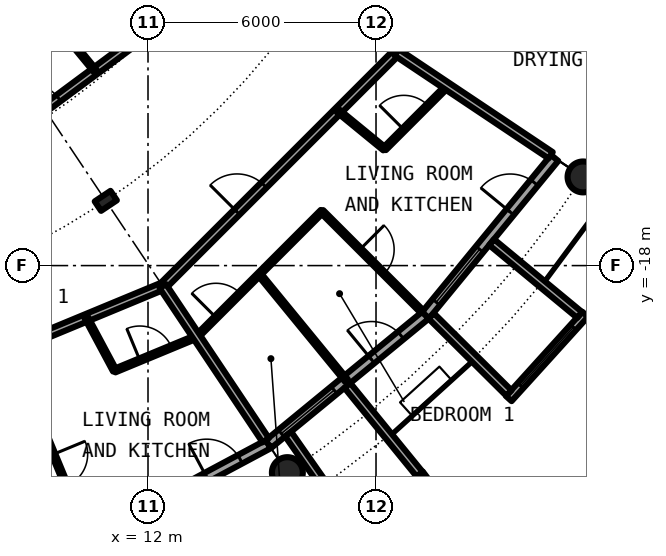
"""IFC4 building model, lengths in metres.
Left out: names, types, materials, properties, quantities, classifications, styles, units other than length and angle.
Written with IfcOpenShell. Run it as: python <this file> out.ifc"""

import sys

from ifc_helpers import new_model, si_unit, direction, frame, frame_2d, origin, origin_2d, place, context, subcontext, project, spatial, rectangle, circle, hollow_circle, i_section, extrude, element, fill, save


model = new_model("IFC4")
c1 = context("Model", 3, precision=1e-05, world=origin(), true_north=direction((0.0, 1.0)))
c2 = subcontext(c1, "Body", "Model", "MODEL_VIEW")
j1 = project(units=[si_unit("LENGTHUNIT", "METRE"), si_unit("PLANEANGLEUNIT", "RADIAN")], contexts=[c1])
p1 = place(None, origin())
s1 = spatial("IfcSite", under=j1, at=p1, CompositionType="ELEMENT")
p2 = place(p1, origin())
s2 = spatial("IfcBuilding", under=s1, at=p2, CompositionType="ELEMENT")
p3 = place(p2, frame((0.0, 0.0, 167.7)))
s3 = spatial("IfcBuildingStorey", under=s2, at=p3, CompositionType="ELEMENT", Elevation=167.7)
for number, where, z_axis, x_axis in (
    (1, (15.667, -23.448, 0.0), (0.0, 0.0, 1.0), (1.0, 0.0, 0.0)),
    (2, (23.448, -15.667, 0.0), (0.0, 0.0, 1.0), (1.0, 0.0, 0.0)),
):
    element("IfcColumn", number, at=place(p3, frame(where, z_axis=z_axis, x_axis=x_axis)), inside=s3, PredefinedType="COLUMN", context=c2, shape_type="SweptSolid", body=[
        extrude(hollow_circle(Radius=0.406, WallThickness=0.04, at=origin_2d()), origin(), (0.0, 0.0, 1.0), 3.05),
    ])
p4 = place(p3, frame((10.889, -16.297, 0.0), z_axis=(0.0, 0.0, 1.0), x_axis=(0.55557023302, -0.831469612303, 0.0)))
e3 = element("IfcColumn", 3, at=p4, inside=s3, PredefinedType="COLUMN", context=c2, shape_type="SweptSolid", body=[
    extrude(i_section(OverallWidth=0.3, OverallDepth=0.5, WebThickness=0.014, FlangeThickness=0.028, FilletRadius=0.027, at=origin_2d()), origin(), (0.0, 0.0, 1.0), 3.05),
])
p5 = place(p3, frame((10.447, -25.222, 0.0), z_axis=(0.0, 0.0, 1.0), x_axis=(0.881915646801, 0.471407246368, 0.0)))
e4 = element("IfcWall", 4, at=p5, inside=s3, PredefinedType="SOLIDWALL", context=c2, shape_type="SweptSolid", body=[
    extrude(rectangle(XDim=5.352, YDim=0.25, at=frame_2d((2.676, 0.0))), origin(), (0.0, 0.0, 1.0), 2.7),
])
p6 = place(p5, frame((0.441, 0.0, 0.3)))
e5 = element("IfcOpeningElement", 5, at=p6, cuts=e4, PredefinedType="OPENING", context=c2, shape_type="SweptSolid", body=[
    extrude(rectangle(XDim=1.8, YDim=2.1, at=frame_2d((0.9, 1.05))), frame((0.0, 0.135, 0.0), z_axis=(0.0, -1.0, 0.0), x_axis=(1.0, 0.0, 0.0)), (0.0, 0.0, 1.0), 0.27),
])
p7 = place(p5, frame((3.51, 0.0, 0.0)))
e6 = element("IfcOpeningElement", 6, at=p7, cuts=e4, PredefinedType="OPENING", context=c2, shape_type="SweptSolid", body=[
    extrude(rectangle(XDim=1.0, YDim=2.2, at=frame_2d((0.5, 1.1))), frame((0.0, 0.135, 0.0), z_axis=(0.0, -1.0, 0.0), x_axis=(1.0, 0.0, 0.0)), (0.0, 0.0, 1.0), 0.27),
])
p8 = place(p3, frame((15.167, -22.699, 0.0), z_axis=(0.0, 0.0, 1.0), x_axis=(0.773019449054, 0.634382322723, 0.0)))
e7 = element("IfcWall", 7, at=p8, inside=s3, PredefinedType="SOLIDWALL", context=c2, shape_type="SweptSolid", body=[
    extrude(rectangle(XDim=5.352, YDim=0.25, at=frame_2d((2.676, 0.0))), origin(), (0.0, 0.0, 1.0), 2.7),
])
p9 = place(p8, frame((0.441, 0.0, 0.3)))
e8 = element("IfcOpeningElement", 8, at=p9, cuts=e7, PredefinedType="OPENING", context=c2, shape_type="SweptSolid", body=[
    extrude(rectangle(XDim=1.8, YDim=2.1, at=frame_2d((0.9, 1.05))), frame((0.0, 0.135, 0.0), z_axis=(0.0, -1.0, 0.0), x_axis=(1.0, 0.0, 0.0)), (0.0, 0.0, 1.0), 0.27),
])
p10 = place(p8, frame((3.51, 0.0, 0.0)))
e9 = element("IfcOpeningElement", 9, at=p10, cuts=e7, PredefinedType="OPENING", context=c2, shape_type="SweptSolid", body=[
    extrude(rectangle(XDim=1.0, YDim=2.2, at=frame_2d((0.5, 1.1))), frame((0.0, 0.135, 0.0), z_axis=(0.0, -1.0, 0.0), x_axis=(1.0, 0.0, 0.0)), (0.0, 0.0, 1.0), 0.27),
])
p11 = place(p3, frame((17.337, -24.972, -0.03), z_axis=(0.0, 0.0, 1.0), x_axis=(0.797887588059, 0.602806268067, 0.0)))
e10 = element("IfcWall", 10, at=p11, inside=s3, PredefinedType="SOLIDWALL", context=c2, shape_type="SweptSolid", body=[
    extrude(rectangle(XDim=2.447, YDim=0.2, at=frame_2d((1.223, 0.0))), origin(), (0.0, 0.0, 1.0), 2.73),
])
p12 = place(p11, frame((0.183, 0.0, 0.33)))
e11 = element("IfcOpeningElement", 11, at=p12, cuts=e10, PredefinedType="OPENING", context=c2, shape_type="SweptSolid", body=[
    extrude(circle(Radius=1.04, at=frame_2d((1.04, 1.04))), frame((0.0, 0.11, 0.0), z_axis=(0.0, -1.0, 0.0), x_axis=(1.0, 0.0, 0.0)), (0.0, 0.0, 1.0), 0.22),
])
p13 = place(p3, frame((15.688, -22.433, -0.03), z_axis=(0.0, 0.0, 1.0), x_axis=(0.573260687834, -0.819373043115, 0.0)))
e12 = element("IfcWall", 12, at=p13, inside=s3, PredefinedType="SOLIDWALL", context=c2, shape_type="SweptSolid", body=[
    extrude(rectangle(XDim=2.925, YDim=0.2, at=frame_2d((1.463, 0.0))), origin(), (0.0, 0.0, 1.0), 2.73),
])
p14 = place(p3, frame((17.246, -21.155, -0.03), z_axis=(0.0, 0.0, 1.0), x_axis=(0.631741648902, -0.775179004516, 0.0)))
e13 = element("IfcWall", 13, at=p14, inside=s3, PredefinedType="SOLIDWALL", context=c2, shape_type="SweptSolid", body=[
    extrude(rectangle(XDim=3.006, YDim=0.2, at=frame_2d((1.503, 0.0))), origin(), (0.0, 0.0, 1.0), 2.73),
])
p15 = place(p3, frame((19.304, -19.304, 0.0), z_axis=(0.0, 0.0, 1.0), x_axis=(0.634382322723, 0.773019449054, 0.0)))
e14 = element("IfcWall", 14, at=p15, inside=s3, PredefinedType="SOLIDWALL", context=c2, shape_type="SweptSolid", body=[
    extrude(rectangle(XDim=5.352, YDim=0.25, at=frame_2d((2.676, 0.0))), origin(), (0.0, 0.0, 1.0), 2.7),
])
p16 = place(p15, frame((0.441, 0.0, 0.3)))
e15 = element("IfcOpeningElement", 15, at=p16, cuts=e14, PredefinedType="OPENING", context=c2, shape_type="SweptSolid", body=[
    extrude(rectangle(XDim=1.8, YDim=2.1, at=frame_2d((0.9, 1.05))), frame((0.0, 0.135, 0.0), z_axis=(0.0, -1.0, 0.0), x_axis=(1.0, 0.0, 0.0)), (0.0, 0.0, 1.0), 0.27),
])
p17 = place(p15, frame((3.51, 0.0, 0.0)))
e16 = element("IfcOpeningElement", 16, at=p17, cuts=e14, PredefinedType="OPENING", context=c2, shape_type="SweptSolid", body=[
    extrude(rectangle(XDim=1.0, YDim=2.2, at=frame_2d((0.5, 1.1))), frame((0.0, 0.135, 0.0), z_axis=(0.0, -1.0, 0.0), x_axis=(1.0, 0.0, 0.0)), (0.0, 0.0, 1.0), 0.27),
])
p18 = place(p3, frame((21.493, -21.5, -0.03), z_axis=(0.0, 0.0, 1.0), x_axis=(0.671506829416, 0.740998365753, 0.0)))
e17 = element("IfcWall", 17, at=p18, inside=s3, PredefinedType="SOLIDWALL", context=c2, shape_type="SweptSolid", body=[
    extrude(rectangle(XDim=2.993, YDim=0.2, at=frame_2d((1.497, 0.0))), origin(), (0.0, 0.0, 1.0), 2.73),
])
p19 = place(p18, frame((0.457, 0.0, 0.33)))
e18 = element("IfcOpeningElement", 18, at=p19, cuts=e17, PredefinedType="OPENING", context=c2, shape_type="SweptSolid", body=[
    extrude(circle(Radius=1.04, at=frame_2d((1.04, 1.04))), frame((0.0, 0.11, 0.0), z_axis=(0.0, -1.0, 0.0), x_axis=(1.0, 0.0, 0.0)), (0.0, 0.0, 1.0), 0.22),
])
p20 = place(p3, frame((19.45, -19.323, -0.03), z_axis=(0.0, 0.0, 1.0), x_axis=(0.709727076896, -0.704476739375, 0.0)))
e19 = element("IfcWall", 19, at=p20, inside=s3, PredefinedType="SOLIDWALL", context=c2, shape_type="SweptSolid", body=[
    extrude(rectangle(XDim=2.883, YDim=0.2, at=frame_2d((1.441, 0.0))), origin(), (0.0, 0.0, 1.0), 2.73),
])
p21 = place(p3, frame((21.041, -17.384, -0.03), z_axis=(0.0, 0.0, 1.0), x_axis=(0.770784861449, -0.63709551667, 0.0)))
e20 = element("IfcWall", 20, at=p21, inside=s3, PredefinedType="SOLIDWALL", context=c2, shape_type="SweptSolid", body=[
    extrude(rectangle(XDim=3.006, YDim=0.2, at=frame_2d((1.503, 0.0))), origin(), (0.0, 0.0, 1.0), 2.73),
])
p22 = place(p3, frame((11.124, -20.764, 0.0), z_axis=(0.0, 0.0, 1.0), x_axis=(0.923938991376, 0.382539854414, 0.0)))
e21 = element("IfcWall", 21, at=p22, inside=s3, PredefinedType="PARTITIONING", context=c2, shape_type="SweptSolid", body=[
    extrude(rectangle(XDim=2.331, YDim=0.1, at=frame_2d((1.166, 0.0))), origin(), (0.0, 0.0, 1.0), 2.7),
])
p23 = place(p22, frame((0.716, 0.0, 0.0)))
e22 = element("IfcOpeningElement", 22, at=p23, cuts=e21, PredefinedType="OPENING", context=c2, shape_type="SweptSolid", body=[
    extrude(rectangle(XDim=0.9, YDim=2.3, at=frame_2d((0.45, 1.15))), frame((0.0, 0.06, 0.0), z_axis=(0.0, -1.0, 0.0), x_axis=(1.0, 0.0, 0.0)), (0.0, 0.0, 1.0), 0.12),
])
p24 = place(p3, frame((13.285, -19.869, 0.0), z_axis=(0.0, 0.0, 1.0), x_axis=(0.706923494552, 0.707290020325, 0.0)))
e23 = element("IfcWall", 23, at=p24, inside=s3, PredefinedType="PARTITIONING", context=c2, shape_type="SweptSolid", body=[
    extrude(rectangle(XDim=4.663, YDim=0.1, at=frame_2d((2.331, 0.0))), origin(), (0.0, 0.0, 1.0), 2.7),
])
p25 = place(p24, frame((0.712, 0.0, 0.0)))
e24 = element("IfcOpeningElement", 24, at=p25, cuts=e23, PredefinedType="OPENING", context=c2, shape_type="SweptSolid", body=[
    extrude(rectangle(XDim=0.9, YDim=2.3, at=frame_2d((0.45, 1.15))), frame((0.0, 0.06, 0.0), z_axis=(0.0, -1.0, 0.0), x_axis=(1.0, 0.0, 0.0)), (0.0, 0.0, 1.0), 0.12),
])
p26 = place(p3, frame((18.224, -14.927, 0.0), z_axis=(0.0, 0.0, 1.0), x_axis=(0.706897299114, 0.707316201218, 0.0)))
e25 = element("IfcWall", 25, at=p26, inside=s3, PredefinedType="PARTITIONING", context=c2, shape_type="SweptSolid", body=[
    extrude(rectangle(XDim=2.331, YDim=0.1, at=frame_2d((1.166, 0.0))), origin(), (0.0, 0.0, 1.0), 2.7),
])
p27 = place(p26, frame((0.716, 0.0, 0.0)))
e26 = element("IfcOpeningElement", 26, at=p27, cuts=e25, PredefinedType="OPENING", context=c2, shape_type="SweptSolid", body=[
    extrude(rectangle(XDim=0.9, YDim=2.3, at=frame_2d((0.45, 1.15))), frame((0.0, 0.06, 0.0), z_axis=(0.0, -1.0, 0.0), x_axis=(1.0, 0.0, 0.0)), (0.0, 0.0, 1.0), 0.12),
])
p28 = place(p3, frame((18.542, -12.389, 0.0), z_axis=(0.0, 0.0, 1.0), x_axis=(0.465605550524, 0.884992356646, 0.0)))
e27 = element("IfcWall", 27, at=p28, inside=s3, PredefinedType="PARTITIONING", context=c2, shape_type="SweptSolid", body=[
    extrude(rectangle(XDim=1.643, YDim=0.2, at=frame_2d((0.821, 0.0))), origin(), (0.0, 0.0, 1.0), 2.7),
])
p29 = place(p3, frame((4.351, -21.872, 0.0), z_axis=(0.0, 0.0, 1.0), x_axis=(0.923825356298, 0.382814199136, 0.0)))
e28 = element("IfcWall", 28, at=p29, inside=s3, PredefinedType="PARTITIONING", context=c2, shape_type="SweptSolid", body=[
    extrude(rectangle(XDim=8.704, YDim=0.2, at=frame_2d((4.352, 0.0))), origin(), (0.0, 0.0, 1.0), 2.7),
])
p30 = place(p29, frame((2.763, 0.0, 0.0)))
e29 = element("IfcOpeningElement", 29, at=p30, cuts=e28, PredefinedType="OPENING", context=c2, shape_type="SweptSolid", body=[
    extrude(rectangle(XDim=1.0, YDim=2.3, at=frame_2d((0.5, 1.15))), frame((0.0, 0.11, 0.0), z_axis=(0.0, -1.0, 0.0), x_axis=(1.0, 0.0, 0.0)), (0.0, 0.0, 1.0), 0.22),
])
p31 = place(p3, frame((12.389, -18.542, 0.0), z_axis=(0.0, 0.0, 1.0), x_axis=(0.707106781187, 0.707106781187, 0.0)))
e30 = element("IfcWall", 30, at=p31, inside=s3, PredefinedType="PARTITIONING", context=c2, shape_type="SweptSolid", body=[
    extrude(rectangle(XDim=8.702, YDim=0.2, at=frame_2d((4.351, 0.0))), origin(), (0.0, 0.0, 1.0), 2.7),
])
p32 = place(p31, frame((2.763, 0.0, 0.0)))
e31 = element("IfcOpeningElement", 31, at=p32, cuts=e30, PredefinedType="OPENING", context=c2, shape_type="SweptSolid", body=[
    extrude(rectangle(XDim=1.0, YDim=2.3, at=frame_2d((0.5, 1.15))), frame((0.0, 0.11, 0.0), z_axis=(0.0, -1.0, 0.0), x_axis=(1.0, 0.0, 0.0)), (0.0, 0.0, 1.0), 0.22),
])
p33 = place(p3, frame((5.137, -16.938, 0.0), z_axis=(0.0, 0.0, 1.0), x_axis=(0.803229232922, 0.595670042371, 0.0)))
e32 = element("IfcWall", 32, at=p33, inside=s3, PredefinedType="PARTITIONING", context=c2, shape_type="SweptSolid", body=[
    extrude(rectangle(XDim=10.224, YDim=0.2, at=frame_2d((5.112, 0.0))), origin(), (0.0, 0.0, 1.0), 2.7),
])
p34 = place(p33, frame((4.612, 0.0, 0.0)))
e33 = element("IfcOpeningElement", 33, at=p34, cuts=e32, PredefinedType="OPENING", context=c2, shape_type="SweptSolid", body=[
    extrude(rectangle(XDim=1.0, YDim=2.3, at=frame_2d((0.5, 1.15))), frame((0.0, 0.11, 0.0), z_axis=(0.0, -1.0, 0.0), x_axis=(1.0, 0.0, 0.0)), (0.0, 0.0, 1.0), 0.22),
])
p35 = place(p3, frame((4.908, -5.959, 0.0), z_axis=(0.0, 0.0, 1.0), x_axis=(0.636115614725, -0.771593756262, 0.0)))
e34 = element("IfcWall", 34, at=p35, inside=s3, PredefinedType="PARTITIONING", context=c2, shape_type="SweptSolid", body=[
    extrude(rectangle(XDim=8.967, YDim=0.1, at=frame_2d((4.483, 0.0))), origin(), (0.0, 0.0, 1.0), 2.7),
])
p36 = place(p35, frame((6.4, 0.0, 0.0)))
e35 = element("IfcOpeningElement", 35, at=p36, cuts=e34, PredefinedType="OPENING", context=c2, shape_type="SweptSolid", body=[
    extrude(rectangle(XDim=0.9, YDim=2.3, at=frame_2d((0.45, 1.15))), frame((0.0, 0.06, 0.0), z_axis=(0.0, -1.0, 0.0), x_axis=(1.0, 0.0, 0.0)), (0.0, 0.0, 1.0), 0.12),
])
p37 = place(p35, frame((1.917, 0.0, 0.0)))
e36 = element("IfcOpeningElement", 36, at=p37, cuts=e34, PredefinedType="OPENING", context=c2, shape_type="SweptSolid", body=[
    extrude(rectangle(XDim=0.9, YDim=2.3, at=frame_2d((0.45, 1.15))), frame((0.0, 0.06, 0.0), z_axis=(0.0, -1.0, 0.0), x_axis=(1.0, 0.0, 0.0)), (0.0, 0.0, 1.0), 0.12),
])
p38 = place(p3, frame((8.97, -21.656, 0.0), z_axis=(0.0, 0.0, 1.0), x_axis=(0.382669377748, -0.923885353999, 0.0)))
e37 = element("IfcWall", 37, at=p38, inside=s3, PredefinedType="PARTITIONING", context=c2, shape_type="SweptSolid", body=[
    extrude(rectangle(XDim=3.734, YDim=0.1, at=frame_2d((1.867, 0.0))), origin(), (0.0, 0.0, 1.0), 2.7),
])
p39 = place(p38, frame((1.417, 0.0, 0.0)))
e38 = element("IfcOpeningElement", 38, at=p39, cuts=e37, PredefinedType="OPENING", context=c2, shape_type="SweptSolid", body=[
    extrude(rectangle(XDim=0.9, YDim=2.3, at=frame_2d((0.45, 1.15))), frame((0.0, 0.06, 0.0), z_axis=(0.0, -1.0, 0.0), x_axis=(1.0, 0.0, 0.0)), (0.0, 0.0, 1.0), 0.12),
])
p40 = place(p3, frame((10.38, -19.374, 0.0), z_axis=(0.0, 0.0, 1.0), x_axis=(0.472002235476, -0.881597351236, 0.0)))
e39 = element("IfcWall", 39, at=p40, inside=s3, PredefinedType="PARTITIONING", context=c2, shape_type="SweptSolid", body=[
    extrude(rectangle(XDim=1.577, YDim=0.1, at=frame_2d((0.788, 0.0))), origin(), (0.0, 0.0, 1.0), 2.7),
])
p41 = place(p3, frame((12.389, -18.542, 0.0), z_axis=(0.0, 0.0, 1.0), x_axis=(0.55569370664, -0.831387096605, 0.0)))
e40 = element("IfcWall", 40, at=p41, inside=s3, PredefinedType="PARTITIONING", context=c2, shape_type="SweptSolid", body=[
    extrude(rectangle(XDim=4.875, YDim=0.2, at=frame_2d((2.438, 0.0))), origin(), (0.0, 0.0, 1.0), 2.7),
])
p42 = place(p3, frame((14.927, -18.224, 0.0), z_axis=(0.0, 0.0, 1.0), x_axis=(0.633737383709, -0.773548271597, 0.0)))
e41 = element("IfcWall", 41, at=p42, inside=s3, PredefinedType="PARTITIONING", context=c2, shape_type="SweptSolid", body=[
    extrude(rectangle(XDim=3.618, YDim=0.1, at=frame_2d((1.809, 0.0))), origin(), (0.0, 0.0, 1.0), 2.7),
])
p43 = place(p3, frame((16.575, -16.575, 0.0), z_axis=(0.0, 0.0, 1.0), x_axis=(0.707106781187, -0.707106781187, 0.0)))
e42 = element("IfcWall", 42, at=p43, inside=s3, PredefinedType="PARTITIONING", context=c2, shape_type="SweptSolid", body=[
    extrude(rectangle(XDim=3.735, YDim=0.1, at=frame_2d((1.868, 0.0))), origin(), (0.0, 0.0, 1.0), 2.7),
])
p44 = place(p43, frame((1.417, 0.0, 0.0)))
e43 = element("IfcOpeningElement", 43, at=p44, cuts=e42, PredefinedType="OPENING", context=c2, shape_type="SweptSolid", body=[
    extrude(rectangle(XDim=0.9, YDim=2.3, at=frame_2d((0.45, 1.15))), frame((0.0, 0.06, 0.0), z_axis=(0.0, -1.0, 0.0), x_axis=(1.0, 0.0, 0.0)), (0.0, 0.0, 1.0), 0.12),
])
p45 = place(p3, frame((17.001, -13.93, 0.0), z_axis=(0.0, 0.0, 1.0), x_axis=(0.773633255921, -0.633633636523, 0.0)))
e44 = element("IfcWall", 44, at=p45, inside=s3, PredefinedType="PARTITIONING", context=c2, shape_type="SweptSolid", body=[
    extrude(rectangle(XDim=1.578, YDim=0.1, at=frame_2d((0.789, 0.0))), origin(), (0.0, 0.0, 1.0), 2.7),
])
p46 = place(p3, frame((18.542, -12.389, 0.0), z_axis=(0.0, 0.0, 1.0), x_axis=(0.831387096605, -0.55569370664, 0.0)))
e45 = element("IfcWall", 45, at=p46, inside=s3, PredefinedType="PARTITIONING", context=c2, shape_type="SweptSolid", body=[
    extrude(rectangle(XDim=4.875, YDim=0.2, at=frame_2d((2.438, 0.0))), origin(), (0.0, 0.0, 1.0), 2.7),
])
p47 = place(p7, origin())
e46 = element("IfcDoor", 46, at=p47, inside=s3, OperationType="SINGLE_SWING_LEFT", PredefinedType="DOOR", context=c2, shape_type="SweptSolid", body=[
    extrude(rectangle(XDim=1.0, YDim=2.2, at=frame_2d((0.5, 1.1))), frame((0.0, 0.025, 0.0), z_axis=(0.0, -1.0, 0.0), x_axis=(1.0, 0.0, 0.0)), (0.0, 0.0, 1.0), 0.05),
])
fill(e6, e46)
p48 = place(p9, origin())
e47 = element("IfcWindow", 47, at=p48, inside=s3, PartitioningType="SINGLE_PANEL", PredefinedType="WINDOW", context=c2, shape_type="SweptSolid", body=[
    extrude(rectangle(XDim=1.8, YDim=2.1, at=frame_2d((0.9, 1.05))), frame((0.0, 0.03, 0.0), z_axis=(0.0, -1.0, 0.0), x_axis=(1.0, 0.0, 0.0)), (0.0, 0.0, 1.0), 0.06),
])
fill(e8, e47)
p49 = place(p10, origin())
e48 = element("IfcDoor", 48, at=p49, inside=s3, OperationType="SINGLE_SWING_LEFT", PredefinedType="DOOR", context=c2, shape_type="SweptSolid", body=[
    extrude(rectangle(XDim=1.0, YDim=2.2, at=frame_2d((0.5, 1.1))), frame((0.0, 0.025, 0.0), z_axis=(0.0, -1.0, 0.0), x_axis=(1.0, 0.0, 0.0)), (0.0, 0.0, 1.0), 0.05),
])
fill(e9, e48)
p50 = place(p16, origin())
e49 = element("IfcWindow", 49, at=p50, inside=s3, PartitioningType="SINGLE_PANEL", PredefinedType="WINDOW", context=c2, shape_type="SweptSolid", body=[
    extrude(rectangle(XDim=1.8, YDim=2.1, at=frame_2d((0.9, 1.05))), frame((0.0, 0.03, 0.0), z_axis=(0.0, -1.0, 0.0), x_axis=(1.0, 0.0, 0.0)), (0.0, 0.0, 1.0), 0.06),
])
fill(e15, e49)
p51 = place(p19, origin())
e50 = element("IfcWindow", 50, at=p51, inside=s3, PartitioningType="SINGLE_PANEL", PredefinedType="WINDOW", context=c2, shape_type="SweptSolid", body=[
    extrude(circle(Radius=1.04, at=frame_2d((1.04, 1.04))), frame((0.0, 0.03, 0.0), z_axis=(0.0, -1.0, 0.0), x_axis=(1.0, 0.0, 0.0)), (0.0, 0.0, 1.0), 0.06),
])
fill(e18, e50)
p52 = place(p17, origin())
e51 = element("IfcDoor", 51, at=p52, inside=s3, OperationType="SINGLE_SWING_LEFT", PredefinedType="DOOR", context=c2, shape_type="SweptSolid", body=[
    extrude(rectangle(XDim=1.0, YDim=2.2, at=frame_2d((0.5, 1.1))), frame((0.0, 0.025, 0.0), z_axis=(0.0, -1.0, 0.0), x_axis=(1.0, 0.0, 0.0)), (0.0, 0.0, 1.0), 0.05),
])
fill(e16, e51)
p53 = place(p23, origin())
e52 = element("IfcDoor", 52, at=p53, inside=s3, OperationType="SINGLE_SWING_RIGHT", PredefinedType="DOOR", context=c2, shape_type="SweptSolid", body=[
    extrude(rectangle(XDim=0.9, YDim=2.3, at=frame_2d((0.45, 1.15))), frame((0.0, 0.025, 0.0), z_axis=(0.0, -1.0, 0.0), x_axis=(1.0, 0.0, 0.0)), (0.0, 0.0, 1.0), 0.05),
])
fill(e22, e52)
p54 = place(p39, origin())
e53 = element("IfcDoor", 53, at=p54, inside=s3, OperationType="SINGLE_SWING_RIGHT", PredefinedType="DOOR", context=c2, shape_type="SweptSolid", body=[
    extrude(rectangle(XDim=0.9, YDim=2.3, at=frame_2d((0.45, 1.15))), frame((0.0, 0.025, 0.0), z_axis=(0.0, -1.0, 0.0), x_axis=(1.0, 0.0, 0.0)), (0.0, 0.0, 1.0), 0.05),
])
fill(e38, e53)
p55 = place(p32, origin())
e54 = element("IfcDoor", 54, at=p55, inside=s3, OperationType="SINGLE_SWING_LEFT", PredefinedType="DOOR", context=c2, shape_type="SweptSolid", body=[
    extrude(rectangle(XDim=1.0, YDim=2.3, at=frame_2d((0.5, 1.15))), frame((0.0, 0.025, 0.0), z_axis=(0.0, -1.0, 0.0), x_axis=(1.0, 0.0, 0.0)), (0.0, 0.0, 1.0), 0.05),
])
fill(e31, e54)
p56 = place(p27, origin())
e55 = element("IfcDoor", 55, at=p56, inside=s3, OperationType="SINGLE_SWING_RIGHT", PredefinedType="DOOR", context=c2, shape_type="SweptSolid", body=[
    extrude(rectangle(XDim=0.9, YDim=2.3, at=frame_2d((0.45, 1.15))), frame((0.0, 0.025, 0.0), z_axis=(0.0, -1.0, 0.0), x_axis=(1.0, 0.0, 0.0)), (0.0, 0.0, 1.0), 0.05),
])
fill(e26, e55)
p57 = place(p44, origin())
e56 = element("IfcDoor", 56, at=p57, inside=s3, OperationType="SINGLE_SWING_RIGHT", PredefinedType="DOOR", context=c2, shape_type="SweptSolid", body=[
    extrude(rectangle(XDim=0.9, YDim=2.3, at=frame_2d((0.45, 1.15))), frame((0.0, 0.025, 0.0), z_axis=(0.0, -1.0, 0.0), x_axis=(1.0, 0.0, 0.0)), (0.0, 0.0, 1.0), 0.05),
])
fill(e43, e56)
p58 = place(p25, origin())
e57 = element("IfcDoor", 57, at=p58, inside=s3, OperationType="SINGLE_SWING_LEFT", PredefinedType="DOOR", context=c2, shape_type="SweptSolid", body=[
    extrude(rectangle(XDim=0.9, YDim=2.3, at=frame_2d((0.45, 1.15))), frame((0.0, 0.025, 0.0), z_axis=(0.0, -1.0, 0.0), x_axis=(1.0, 0.0, 0.0)), (0.0, 0.0, 1.0), 0.05),
])
fill(e24, e57)
p59 = place(p34, origin())
e58 = element("IfcDoor", 58, at=p59, inside=s3, OperationType="SINGLE_SWING_RIGHT", PredefinedType="DOOR", context=c2, shape_type="SweptSolid", body=[
    extrude(rectangle(XDim=1.0, YDim=2.3, at=frame_2d((0.5, 1.15))), frame((0.0, 0.025, 0.0), z_axis=(0.0, -1.0, 0.0), x_axis=(1.0, 0.0, 0.0)), (0.0, 0.0, 1.0), 0.05),
])
fill(e33, e58)
save(model, sys.argv[1])
